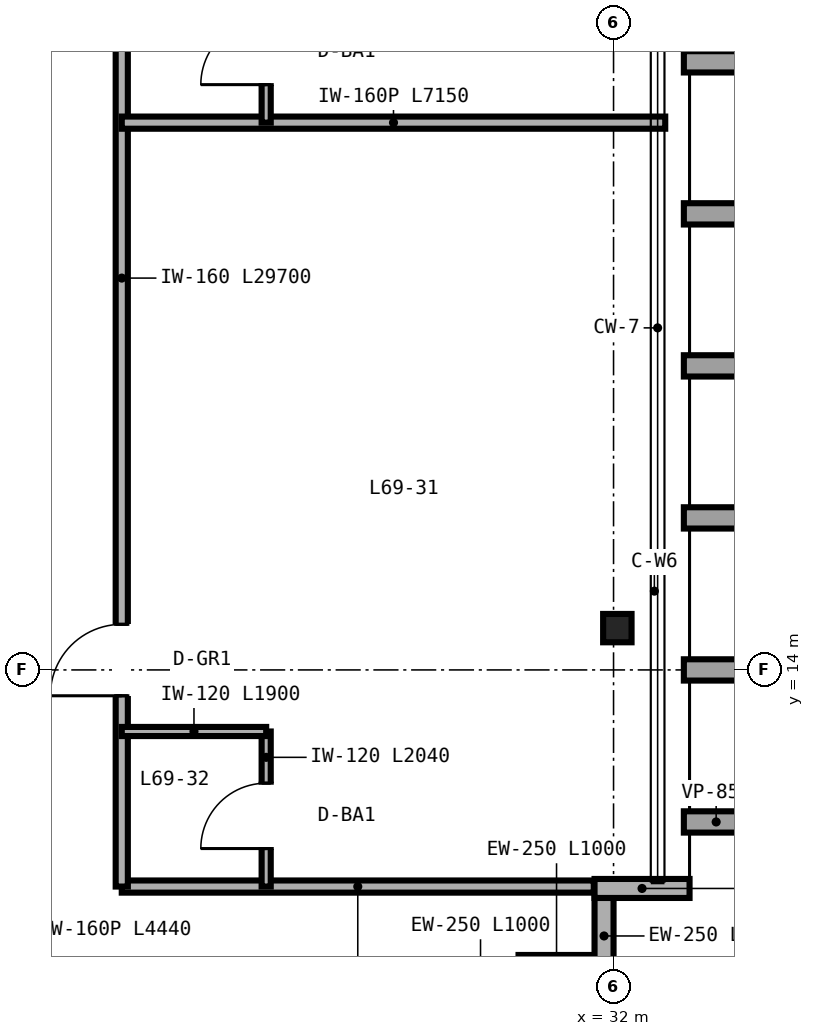
"""IFC4 building model, lengths in metres.
Left out: names, types, materials, properties, quantities, classifications, styles, units other than length and angle.
Written with IfcOpenShell. Run it as: python <this file> out.ifc"""

import sys

from ifc_helpers import new_model, si_unit, direction, frame, frame_2d, origin, origin_2d, place, context, subcontext, project, spatial, rectangle, i_section, extrude, source, transform, mapped, element, fill, save


model = new_model("IFC4")
c1 = context("Model", 3, precision=1e-05, world=origin(), true_north=direction((0.0, 1.0)))
c2 = subcontext(c1, "Body", "Model", "MODEL_VIEW")
j1 = project(units=[si_unit("LENGTHUNIT", "METRE"), si_unit("PLANEANGLEUNIT", "RADIAN")], contexts=[c1])
p1 = place(None, origin())
s1 = spatial("IfcSite", under=j1, at=p1, CompositionType="ELEMENT")
p2 = place(p1, origin())
s2 = spatial("IfcBuilding", under=s1, at=p2, CompositionType="ELEMENT")
p3 = place(p2, frame((0.0, 0.0, 272.4)))
s3 = spatial("IfcBuildingStorey", under=s2, at=p3, CompositionType="ELEMENT", Elevation=272.4)
m1 = source(origin(), c2, "Body", "SweptSolid", [
    extrude(i_section(OverallWidth=0.374, OverallDepth=0.373, WebThickness=0.016, FlangeThickness=0.026, FilletRadius=0.025, at=origin_2d()), origin(), (0.0, 0.0, 1.0), 3.38),
])
p4 = place(p3, frame((32.05, 14.55, 0.0), z_axis=(0.0, 0.0, 1.0), x_axis=(1.0, 0.0, 0.0)))
e1 = element("IfcColumn", 1, at=p4, inside=s3, PredefinedType="COLUMN", context=c2, shape_type="MappedRepresentation", body=[
    mapped(m1, transform((0.0, 0.0, 0.0), scale=1.0)),
])
for number, where, z_axis, x_axis in (
    (2, (30.75, 10.125, 0.0), (0.0, 0.0, 1.0), (1.0, 0.0, 0.0)),
    (3, (31.875, 10.0, 0.0), (0.0, 0.0, 1.0), (0.0, 1.0, 0.0)),
):
    element("IfcWall", number, at=place(p3, frame(where, z_axis=z_axis, x_axis=x_axis)), inside=s3, PredefinedType="SOLIDWALL", context=c2, shape_type="SweptSolid", body=[
        extrude(rectangle(XDim=1.0, YDim=0.25, at=frame_2d((0.5, 0.0))), origin(), (0.0, 0.0, 1.0), 3.38),
    ])
p5 = place(p3, frame((31.75, 11.125, 0.0), z_axis=(0.0, 0.0, 1.0), x_axis=(1.0, 0.0, 0.0)))
e4 = element("IfcWall", 4, at=p5, inside=s3, PredefinedType="SOLIDWALL", context=c2, shape_type="SweptSolid", body=[
    extrude(rectangle(XDim=1.25, YDim=0.25, at=frame_2d((0.625, 0.0))), origin(), (0.0, 0.0, 1.0), 3.38),
])
p6 = place(p3, frame((25.53, 11.15, 0.0), z_axis=(0.0, 0.0, 1.0), x_axis=(1.0, 0.0, 0.0)))
e5 = element("IfcWall", 5, at=p6, inside=s3, PredefinedType="PARTITIONING", context=c2, shape_type="SweptSolid", body=[
    extrude(rectangle(XDim=6.21, YDim=0.16, at=frame_2d((3.105, 0.0))), origin(), (0.0, 0.0, 1.0), 3.38),
])
p7 = place(p3, frame((25.53, 11.15, 0.0), z_axis=(0.0, 0.0, 1.0), x_axis=(0.0, 1.0, 0.0)))
e6 = element("IfcWall", 6, at=p7, inside=s3, PredefinedType="PARTITIONING", context=c2, shape_type="SweptSolid", body=[
    extrude(rectangle(XDim=29.7, YDim=0.16, at=frame_2d((14.85, 0.0))), origin(), (0.0, 0.0, 1.0), 2.524),
])
p8 = place(p7, frame((2.51, 0.0, 0.0)))
e7 = element("IfcOpeningElement", 7, at=p8, cuts=e6, PredefinedType="OPENING", context=c2, shape_type="SweptSolid", body=[
    extrude(rectangle(XDim=0.94, YDim=2.15, at=frame_2d((0.47, 1.075))), frame((0.0, 0.09, 0.0), z_axis=(0.0, -1.0, 0.0), x_axis=(1.0, 0.0, 0.0)), (0.0, 0.0, 1.0), 0.18),
])
p9 = place(p7, frame((12.56, 0.0, 0.0)))
e8 = element("IfcOpeningElement", 8, at=p9, cuts=e6, PredefinedType="OPENING", context=c2, shape_type="SweptSolid", body=[
    extrude(rectangle(XDim=0.94, YDim=2.15, at=frame_2d((0.47, 1.075))), frame((0.0, 0.09, 0.0), z_axis=(0.0, -1.0, 0.0), x_axis=(1.0, 0.0, 0.0)), (0.0, 0.0, 1.0), 0.18),
])
p10 = place(p7, frame((22.16, 0.0, 0.0)))
e9 = element("IfcOpeningElement", 9, at=p10, cuts=e6, PredefinedType="OPENING", context=c2, shape_type="SweptSolid", body=[
    extrude(rectangle(XDim=0.94, YDim=2.15, at=frame_2d((0.47, 1.075))), frame((0.0, 0.09, 0.0), z_axis=(0.0, -1.0, 0.0), x_axis=(1.0, 0.0, 0.0)), (0.0, 0.0, 1.0), 0.18),
])
p11 = place(p3, frame((25.53, 21.2, 0.0), z_axis=(0.0, 0.0, 1.0), x_axis=(1.0, 0.0, 0.0)))
e10 = element("IfcWall", 10, at=p11, inside=s3, PredefinedType="PARTITIONING", context=c2, shape_type="SweptSolid", body=[
    extrude(rectangle(XDim=7.15, YDim=0.16, at=frame_2d((3.575, 0.0))), origin(), (0.0, 0.0, 1.0), 2.601),
])
p12 = place(p3, frame((27.43, 11.15, 0.0), z_axis=(0.0, 0.0, 1.0), x_axis=(0.0, 1.0, 0.0)))
e11 = element("IfcWall", 11, at=p12, inside=s3, PredefinedType="PARTITIONING", context=c2, shape_type="SweptSolid", body=[
    extrude(rectangle(XDim=2.04, YDim=0.12, at=frame_2d((1.02, 0.0))), origin(), (0.0, 0.0, 1.0), 3.38),
])
p13 = place(p12, frame((0.5, 0.0, 0.0)))
e12 = element("IfcOpeningElement", 12, at=p13, cuts=e11, PredefinedType="OPENING", context=c2, shape_type="SweptSolid", body=[
    extrude(rectangle(XDim=0.86, YDim=2.1, at=frame_2d((0.43, 1.05))), frame((0.0, 0.07, 0.0), z_axis=(0.0, -1.0, 0.0), x_axis=(1.0, 0.0, 0.0)), (0.0, 0.0, 1.0), 0.14),
])
p14 = place(p3, frame((25.53, 13.19, 0.0), z_axis=(0.0, 0.0, 1.0), x_axis=(1.0, 0.0, 0.0)))
e13 = element("IfcWall", 13, at=p14, inside=s3, PredefinedType="PARTITIONING", context=c2, shape_type="SweptSolid", body=[
    extrude(rectangle(XDim=1.9, YDim=0.12, at=frame_2d((0.95, 0.0))), origin(), (0.0, 0.0, 1.0), 3.38),
])
p15 = place(p3, frame((27.43, 21.2, 0.0), z_axis=(0.0, 0.0, 1.0), x_axis=(0.0, 1.0, 0.0)))
e14 = element("IfcWall", 14, at=p15, inside=s3, PredefinedType="PARTITIONING", context=c2, shape_type="SweptSolid", body=[
    extrude(rectangle(XDim=2.04, YDim=0.12, at=frame_2d((1.02, 0.0))), origin(), (0.0, 0.0, 1.0), 3.38),
])
p16 = place(p15, frame((0.5, 0.0, 0.0)))
e15 = element("IfcOpeningElement", 15, at=p16, cuts=e14, PredefinedType="OPENING", context=c2, shape_type="SweptSolid", body=[
    extrude(rectangle(XDim=0.86, YDim=2.1, at=frame_2d((0.43, 1.05))), frame((0.0, 0.07, 0.0), z_axis=(0.0, -1.0, 0.0), x_axis=(1.0, 0.0, 0.0)), (0.0, 0.0, 1.0), 0.14),
])
m2 = source(origin(), c2, "Body", "SweptSolid", [
    extrude(rectangle(XDim=0.86, YDim=2.1, at=frame_2d((0.43, 1.05))), frame((0.0, 0.025, 0.0), z_axis=(0.0, -1.0, 0.0), x_axis=(1.0, 0.0, 0.0)), (0.0, 0.0, 1.0), 0.05),
])
p17 = place(p13, origin())
e16 = element("IfcDoor", 16, at=p17, inside=s3, OperationType="SINGLE_SWING_LEFT", PredefinedType="DOOR", context=c2, shape_type="MappedRepresentation", body=[
    mapped(m2, transform((0.0, 0.0, 0.0), scale=1.0)),
])
fill(e12, e16)
m3 = source(origin(), c2, "Body", "SweptSolid", [
    extrude(rectangle(XDim=0.94, YDim=2.15, at=frame_2d((0.47, 1.075))), frame((0.0, 0.025, 0.0), z_axis=(0.0, -1.0, 0.0), x_axis=(1.0, 0.0, 0.0)), (0.0, 0.0, 1.0), 0.05),
])
p18 = place(p8, origin())
e17 = element("IfcDoor", 17, at=p18, inside=s3, OperationType="SINGLE_SWING_LEFT", PredefinedType="DOOR", context=c2, shape_type="MappedRepresentation", body=[
    mapped(m3, transform((0.0, 0.0, 0.0), scale=1.0)),
])
fill(e7, e17)
p19 = place(p16, origin())
e18 = element("IfcDoor", 18, at=p19, inside=s3, OperationType="SINGLE_SWING_LEFT", PredefinedType="DOOR", context=c2, shape_type="MappedRepresentation", body=[
    mapped(m2, transform((0.0, 0.0, 0.0), scale=1.0)),
])
fill(e15, e18)
save(model, sys.argv[1])
